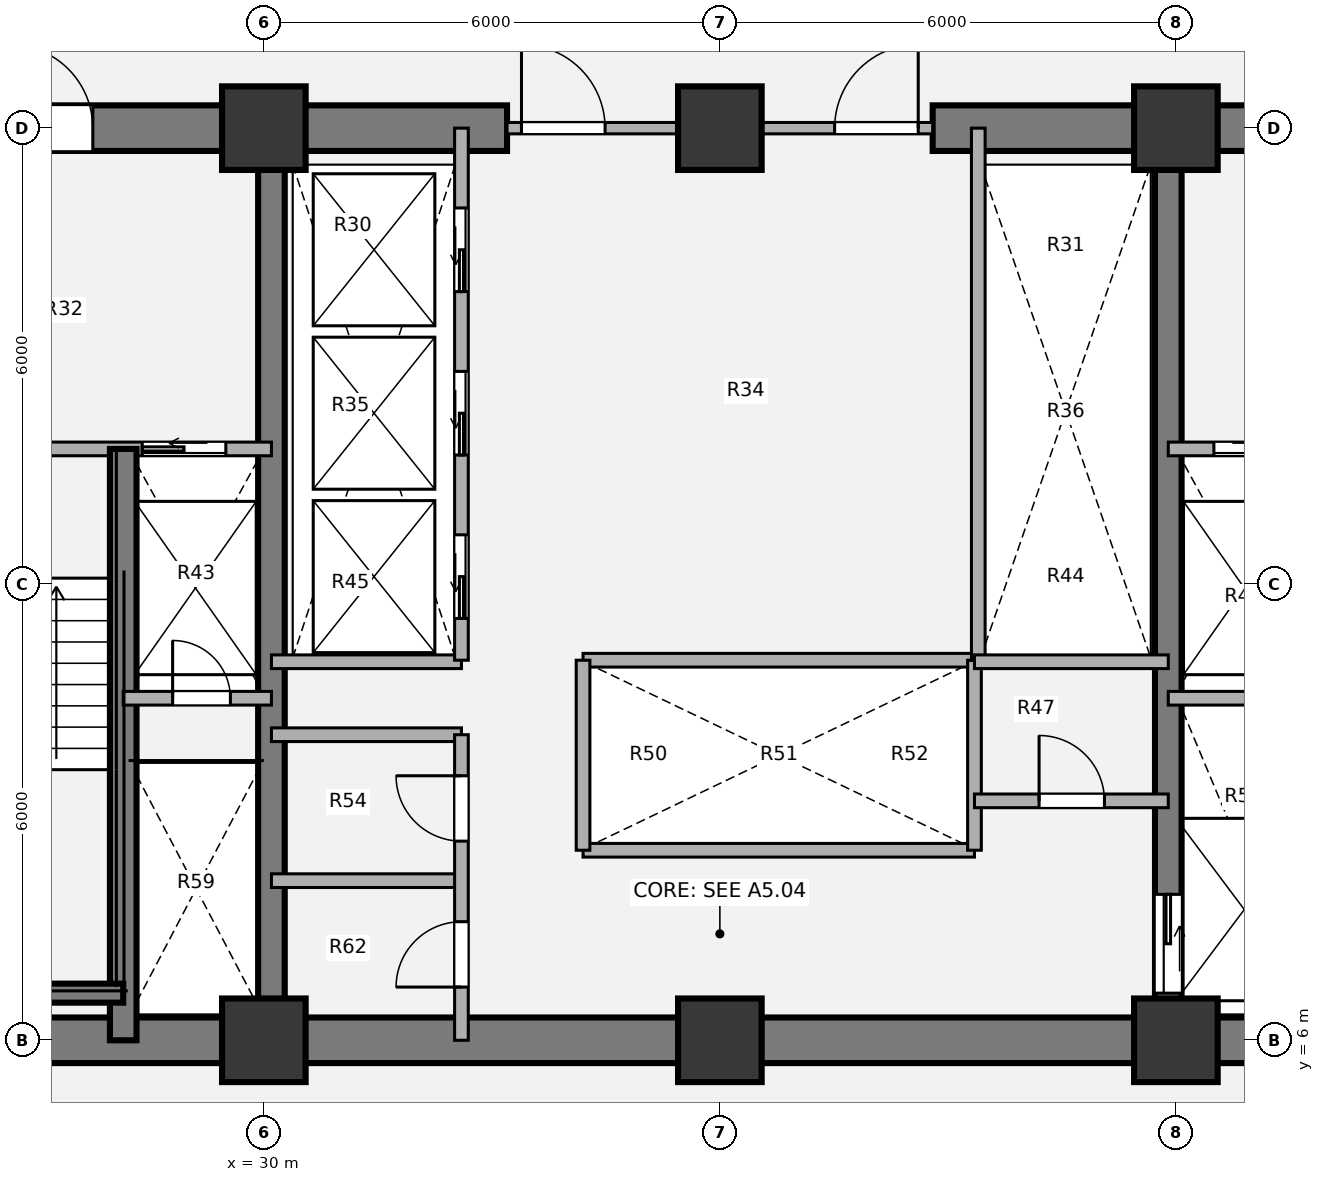
"""IFC4 building model, lengths in metres.
Left out: names, types, materials, properties, quantities, classifications, styles, units other than length and angle.
Written with IfcOpenShell. Run it as: python <this file> out.ifc"""

import sys

from ifc_helpers import new_model, si_unit, direction, frame, frame_2d, origin, origin_2d, place, context, subcontext, project, spatial, rectangle, extrude, source, transform, mapped, element, fill, save


model = new_model("IFC4")
c1 = context("Model", 3, precision=1e-05, world=origin(), true_north=direction((0.0, 1.0)))
c2 = subcontext(c1, "Body", "Model", "MODEL_VIEW")
j1 = project(units=[si_unit("LENGTHUNIT", "METRE"), si_unit("PLANEANGLEUNIT", "RADIAN")], contexts=[c1])
p1 = place(None, origin())
s1 = spatial("IfcSite", under=j1, at=p1, CompositionType="ELEMENT")
p2 = place(p1, origin())
s2 = spatial("IfcBuilding", under=s1, at=p2, CompositionType="ELEMENT")
p3 = place(p2, frame((0.0, 0.0, 68.58)))
s3 = spatial("IfcBuildingStorey", under=s2, at=p3, CompositionType="ELEMENT", Elevation=68.58)
m1 = source(origin(), c2, "Body", "SweptSolid", [
    extrude(rectangle(XDim=1.1, YDim=1.1, at=origin_2d()), origin(), (0.0, 0.0, 1.0), 3.78),
])
for number, where, z_axis, x_axis in (
    (1, (30.0, 6.0, 0.0), (0.0, 0.0, 1.0), (1.0, 0.0, 0.0)),
    (2, (36.0, 6.0, 0.0), (0.0, 0.0, 1.0), (1.0, 0.0, 0.0)),
    (3, (42.0, 6.0, 0.0), (0.0, 0.0, 1.0), (1.0, 0.0, 0.0)),
    (4, (30.0, 18.0, 0.0), (0.0, 0.0, 1.0), (1.0, 0.0, 0.0)),
    (5, (36.0, 18.0, 0.0), (0.0, 0.0, 1.0), (1.0, 0.0, 0.0)),
    (6, (42.0, 18.0, 0.0), (0.0, 0.0, 1.0), (1.0, 0.0, 0.0)),
):
    element("IfcColumn", number, at=place(p3, frame(where, z_axis=z_axis, x_axis=x_axis)), inside=s3, PredefinedType="COLUMN", context=c2, shape_type="MappedRepresentation", body=[
        mapped(m1, transform((0.0, 0.0, 0.0), x_axis=(1.0, 0.0, 0.0), y_axis=(0.0, 1.0, 0.0), z_axis=(0.0, 0.0, 1.0), scale=1.0)),
    ])
p4 = place(p3, frame((48.3, 6.0, 0.0), z_axis=(0.0, 0.0, 1.0), x_axis=(-1.0, 0.0, 0.0)))
e7 = element("IfcWall", 7, at=p4, inside=s3, PredefinedType="SHEAR", context=c2, shape_type="SweptSolid", body=[
    extrude(rectangle(XDim=24.6, YDim=0.6, at=frame_2d((12.3, 0.0))), origin(), (0.0, 0.0, 1.0), 3.78),
])
p5 = place(p3, frame((23.7, 18.0, 0.0), z_axis=(0.0, 0.0, 1.0), x_axis=(1.0, 0.0, 0.0)))
e8 = element("IfcWall", 8, at=p5, inside=s3, PredefinedType="SHEAR", context=c2, shape_type="SweptSolid", body=[
    extrude(rectangle(XDim=9.5, YDim=0.6, at=frame_2d((4.75, 0.0))), origin(), (0.0, 0.0, 1.0), 3.78),
])
p6 = place(p5, frame((2.95, 0.0, 0.0)))
e9 = element("IfcOpeningElement", 9, at=p6, cuts=e8, PredefinedType="OPENING", context=c2, shape_type="SweptSolid", body=[
    extrude(rectangle(XDim=1.1, YDim=2.1, at=origin_2d()), frame((0.55, 0.31, 1.05), z_axis=(0.0, -1.0, 0.0), x_axis=(1.0, 0.0, 0.0)), (0.0, 0.0, 1.0), 0.62),
])
p7 = place(p3, frame((38.8, 18.0, 0.0), z_axis=(0.0, 0.0, 1.0), x_axis=(1.0, 0.0, 0.0)))
e10 = element("IfcWall", 10, at=p7, inside=s3, PredefinedType="SHEAR", context=c2, shape_type="SweptSolid", body=[
    extrude(rectangle(XDim=9.5, YDim=0.6, at=frame_2d((4.75, 0.0))), origin(), (0.0, 0.0, 1.0), 3.78),
])
p8 = place(p7, frame((5.45, 0.0, 0.0)))
e11 = element("IfcOpeningElement", 11, at=p8, cuts=e10, PredefinedType="OPENING", context=c2, shape_type="SweptSolid", body=[
    extrude(rectangle(XDim=1.1, YDim=2.1, at=origin_2d()), frame((0.55, 0.31, 1.05), z_axis=(0.0, -1.0, 0.0), x_axis=(1.0, 0.0, 0.0)), (0.0, 0.0, 1.0), 0.62),
])
p9 = place(p3, frame((30.1, 6.0, 0.0), z_axis=(0.0, 0.0, 1.0), x_axis=(0.0, 1.0, 0.0)))
e12 = element("IfcWall", 12, at=p9, inside=s3, PredefinedType="SHEAR", context=c2, shape_type="SweptSolid", body=[
    extrude(rectangle(XDim=12.0, YDim=0.35, at=frame_2d((6.0, 0.0))), origin(), (0.0, 0.0, 1.0), 3.78),
])
p10 = place(p3, frame((41.9, 18.0, 0.0), z_axis=(0.0, 0.0, 1.0), x_axis=(0.0, -1.0, 0.0)))
e13 = element("IfcWall", 13, at=p10, inside=s3, PredefinedType="SHEAR", context=c2, shape_type="SweptSolid", body=[
    extrude(rectangle(XDim=12.0, YDim=0.35, at=frame_2d((6.0, 0.0))), origin(), (0.0, 0.0, 1.0), 3.78),
])
p11 = place(p10, frame((10.08, 0.0, 0.0)))
e14 = element("IfcOpeningElement", 14, at=p11, cuts=e13, PredefinedType="OPENING", context=c2, shape_type="SweptSolid", body=[
    extrude(rectangle(XDim=1.3, YDim=2.1, at=origin_2d()), frame((0.65, 0.185, 1.05), z_axis=(0.0, -1.0, 0.0), x_axis=(1.0, 0.0, 0.0)), (0.0, 0.0, 1.0), 0.37),
])
for number, where, z_axis, x_axis in (
    (15, (34.2, 11.0, 0.0), (0.0, 0.0, 1.0), (1.0, 0.0, 0.0)),
    (16, (34.2, 8.5, 0.0), (0.0, 0.0, 1.0), (1.0, 0.0, 0.0)),
):
    element("IfcWall", number, at=place(p3, frame(where, z_axis=z_axis, x_axis=x_axis)), inside=s3, PredefinedType="PARTITIONING", context=c2, shape_type="SweptSolid", body=[
        extrude(rectangle(XDim=5.15, YDim=0.18, at=frame_2d((2.575, 0.0))), origin(), (0.0, 0.0, 1.0), 3.5),
    ])
for number, where, z_axis, x_axis in (
    (17, (34.2, 8.5, 0.0), (0.0, 0.0, 1.0), (0.0, 1.0, 0.0)),
    (18, (39.35, 8.5, 0.0), (0.0, 0.0, 1.0), (0.0, 1.0, 0.0)),
):
    element("IfcWall", number, at=place(p3, frame(where, z_axis=z_axis, x_axis=x_axis)), inside=s3, PredefinedType="PARTITIONING", context=c2, shape_type="SweptSolid", body=[
        extrude(rectangle(XDim=2.5, YDim=0.18, at=frame_2d((1.25, 0.0))), origin(), (0.0, 0.0, 1.0), 3.5),
    ])
p12 = place(p3, frame((39.4, 11.0, 0.0), z_axis=(0.0, 0.0, 1.0), x_axis=(0.0, 1.0, 0.0)))
e19 = element("IfcWall", 19, at=p12, inside=s3, PredefinedType="PARTITIONING", context=c2, shape_type="SweptSolid", body=[
    extrude(rectangle(XDim=7.0, YDim=0.18, at=frame_2d((3.5, 0.0))), origin(), (0.0, 0.0, 1.0), 3.5),
])
p13 = place(p3, frame((30.1, 10.98, 0.0), z_axis=(0.0, 0.0, 1.0), x_axis=(1.0, 0.0, 0.0)))
e20 = element("IfcWall", 20, at=p13, inside=s3, PredefinedType="PARTITIONING", context=c2, shape_type="SweptSolid", body=[
    extrude(rectangle(XDim=2.5, YDim=0.18, at=frame_2d((1.25, 0.0))), origin(), (0.0, 0.0, 1.0), 3.5),
])
p14 = place(p3, frame((39.35, 10.98, 0.0), z_axis=(0.0, 0.0, 1.0), x_axis=(1.0, 0.0, 0.0)))
e21 = element("IfcWall", 21, at=p14, inside=s3, PredefinedType="PARTITIONING", context=c2, shape_type="SweptSolid", body=[
    extrude(rectangle(XDim=2.55, YDim=0.18, at=frame_2d((1.275, 0.0))), origin(), (0.0, 0.0, 1.0), 3.5),
])
for number, where, z_axis, x_axis in (
    (22, (30.1, 8.1, 0.0), (0.0, 0.0, 1.0), (1.0, 0.0, 0.0)),
    (23, (30.1, 10.02, 0.0), (0.0, 0.0, 1.0), (1.0, 0.0, 0.0)),
):
    element("IfcWall", number, at=place(p3, frame(where, z_axis=z_axis, x_axis=x_axis)), inside=s3, PredefinedType="PARTITIONING", context=c2, shape_type="SweptSolid", body=[
        extrude(rectangle(XDim=2.5, YDim=0.18, at=frame_2d((1.25, 0.0))), origin(), (0.0, 0.0, 1.0), 3.5),
    ])
p15 = place(p3, frame((32.6, 6.0, 0.0), z_axis=(0.0, 0.0, 1.0), x_axis=(0.0, 1.0, 0.0)))
e24 = element("IfcWall", 24, at=p15, inside=s3, PredefinedType="PARTITIONING", context=c2, shape_type="SweptSolid", body=[
    extrude(rectangle(XDim=4.02, YDim=0.18, at=frame_2d((2.01, 0.0))), origin(), (0.0, 0.0, 1.0), 3.5),
])
p16 = place(p15, frame((0.7, 0.0, 0.0)))
e25 = element("IfcOpeningElement", 25, at=p16, cuts=e24, PredefinedType="OPENING", context=c2, shape_type="SweptSolid", body=[
    extrude(rectangle(XDim=0.86, YDim=2.1, at=origin_2d()), frame((0.43, 0.1, 1.05), z_axis=(0.0, -1.0, 0.0), x_axis=(1.0, 0.0, 0.0)), (0.0, 0.0, 1.0), 0.2),
])
p17 = place(p15, frame((2.62, 0.0, 0.0)))
e26 = element("IfcOpeningElement", 26, at=p17, cuts=e24, PredefinedType="OPENING", context=c2, shape_type="SweptSolid", body=[
    extrude(rectangle(XDim=0.86, YDim=2.1, at=origin_2d()), frame((0.43, 0.1, 1.05), z_axis=(0.0, -1.0, 0.0), x_axis=(1.0, 0.0, 0.0)), (0.0, 0.0, 1.0), 0.2),
])
p18 = place(p3, frame((39.35, 9.15, 0.0), z_axis=(0.0, 0.0, 1.0), x_axis=(1.0, 0.0, 0.0)))
e27 = element("IfcWall", 27, at=p18, inside=s3, PredefinedType="PARTITIONING", context=c2, shape_type="SweptSolid", body=[
    extrude(rectangle(XDim=2.55, YDim=0.18, at=frame_2d((1.275, 0.0))), origin(), (0.0, 0.0, 1.0), 3.5),
])
p19 = place(p18, frame((0.85, 0.0, 0.0)))
e28 = element("IfcOpeningElement", 28, at=p19, cuts=e27, PredefinedType="OPENING", context=c2, shape_type="SweptSolid", body=[
    extrude(rectangle(XDim=0.86, YDim=2.1, at=origin_2d()), frame((0.43, 0.1, 1.05), z_axis=(0.0, -1.0, 0.0), x_axis=(1.0, 0.0, 0.0)), (0.0, 0.0, 1.0), 0.2),
])
p20 = place(p3, frame((33.2, 18.0, 0.0), z_axis=(0.0, 0.0, 1.0), x_axis=(1.0, 0.0, 0.0)))
e29 = element("IfcWall", 29, at=p20, inside=s3, PredefinedType="PARTITIONING", context=c2, shape_type="SweptSolid", body=[
    extrude(rectangle(XDim=5.6, YDim=0.15, at=frame_2d((2.8, 0.0))), origin(), (0.0, 0.0, 1.0), 2.315),
])
p21 = place(p20, frame((0.19, 0.0, 0.0)))
e30 = element("IfcOpeningElement", 30, at=p21, cuts=e29, PredefinedType="OPENING", context=c2, shape_type="SweptSolid", body=[
    extrude(rectangle(XDim=1.1, YDim=2.1, at=origin_2d()), frame((0.55, 0.085, 1.05), z_axis=(0.0, -1.0, 0.0), x_axis=(1.0, 0.0, 0.0)), (0.0, 0.0, 1.0), 0.17),
])
p22 = place(p20, frame((4.31, 0.0, 0.0)))
e31 = element("IfcOpeningElement", 31, at=p22, cuts=e29, PredefinedType="OPENING", context=c2, shape_type="SweptSolid", body=[
    extrude(rectangle(XDim=1.1, YDim=2.1, at=origin_2d()), frame((0.55, 0.085, 1.05), z_axis=(0.0, -1.0, 0.0), x_axis=(1.0, 0.0, 0.0)), (0.0, 0.0, 1.0), 0.17),
])
p23 = place(p3, frame((24.0, 13.78, 0.0), z_axis=(0.0, 0.0, 1.0), x_axis=(1.0, 0.0, 0.0)))
e32 = element("IfcWall", 32, at=p23, inside=s3, PredefinedType="PARTITIONING", context=c2, shape_type="SweptSolid", body=[
    extrude(rectangle(XDim=6.1, YDim=0.18, at=frame_2d((3.05, 0.0))), origin(), (0.0, 0.0, 1.0), 3.5),
])
p24 = place(p23, frame((1.15, 0.0, 0.0)))
e33 = element("IfcOpeningElement", 33, at=p24, cuts=e32, PredefinedType="OPENING", context=c2, shape_type="SweptSolid", body=[
    extrude(rectangle(XDim=1.1, YDim=2.1, at=origin_2d()), frame((0.55, 0.1, 1.05), z_axis=(0.0, -1.0, 0.0), x_axis=(1.0, 0.0, 0.0)), (0.0, 0.0, 1.0), 0.2),
])
p25 = place(p23, frame((4.4, 0.0, 0.0)))
e34 = element("IfcOpeningElement", 34, at=p25, cuts=e32, PredefinedType="OPENING", context=c2, shape_type="SweptSolid", body=[
    extrude(rectangle(XDim=1.1, YDim=2.1, at=origin_2d()), frame((0.55, 0.1, 1.05), z_axis=(0.0, -1.0, 0.0), x_axis=(1.0, 0.0, 0.0)), (0.0, 0.0, 1.0), 0.2),
])
p26 = place(p3, frame((28.15, 6.0, 0.0), z_axis=(0.0, 0.0, 1.0), x_axis=(0.0, 1.0, 0.0)))
e35 = element("IfcWall", 35, at=p26, inside=s3, PredefinedType="SHEAR", context=c2, shape_type="SweptSolid", body=[
    extrude(rectangle(XDim=7.78, YDim=0.35, at=frame_2d((3.89, 0.0))), origin(), (0.0, 0.0, 1.0), 3.85),
])
p27 = place(p3, frame((24.58, 6.62, 0.0), z_axis=(0.0, 0.0, 1.0), x_axis=(1.0, 0.0, 0.0)))
e36 = element("IfcWall", 36, at=p27, inside=s3, PredefinedType="SHEAR", context=c2, shape_type="SweptSolid", body=[
    extrude(rectangle(XDim=3.57, YDim=0.25, at=frame_2d((1.785, 0.0))), origin(), (0.0, 0.0, 1.0), 3.85),
])
p28 = place(p3, frame((28.15, 10.5, 0.0), z_axis=(0.0, 0.0, 1.0), x_axis=(1.0, 0.0, 0.0)))
e37 = element("IfcWall", 37, at=p28, inside=s3, PredefinedType="PARTITIONING", context=c2, shape_type="SweptSolid", body=[
    extrude(rectangle(XDim=1.95, YDim=0.18, at=frame_2d((0.975, 0.0))), origin(), (0.0, 0.0, 1.0), 3.5),
])
p29 = place(p28, frame((0.65, 0.0, 0.0)))
e38 = element("IfcOpeningElement", 38, at=p29, cuts=e37, PredefinedType="OPENING", context=c2, shape_type="SweptSolid", body=[
    extrude(rectangle(XDim=0.76, YDim=2.05, at=origin_2d()), frame((0.38, 0.1, 1.025), z_axis=(0.0, -1.0, 0.0), x_axis=(1.0, 0.0, 0.0)), (0.0, 0.0, 1.0), 0.2),
])
p30 = place(p3, frame((41.9, 13.78, 0.0), z_axis=(0.0, 0.0, 1.0), x_axis=(1.0, 0.0, 0.0)))
e39 = element("IfcWall", 39, at=p30, inside=s3, PredefinedType="PARTITIONING", context=c2, shape_type="SweptSolid", body=[
    extrude(rectangle(XDim=6.1, YDim=0.18, at=frame_2d((3.05, 0.0))), origin(), (0.0, 0.0, 1.0), 3.5),
])
p31 = place(p30, frame((0.6, 0.0, 0.0)))
e40 = element("IfcOpeningElement", 40, at=p31, cuts=e39, PredefinedType="OPENING", context=c2, shape_type="SweptSolid", body=[
    extrude(rectangle(XDim=1.1, YDim=2.1, at=origin_2d()), frame((0.55, 0.1, 1.05), z_axis=(0.0, -1.0, 0.0), x_axis=(1.0, 0.0, 0.0)), (0.0, 0.0, 1.0), 0.2),
])
p32 = place(p30, frame((3.8, 0.0, 0.0)))
e41 = element("IfcOpeningElement", 41, at=p32, cuts=e39, PredefinedType="OPENING", context=c2, shape_type="SweptSolid", body=[
    extrude(rectangle(XDim=1.1, YDim=2.1, at=origin_2d()), frame((0.55, 0.1, 1.05), z_axis=(0.0, -1.0, 0.0), x_axis=(1.0, 0.0, 0.0)), (0.0, 0.0, 1.0), 0.2),
])
p33 = place(p3, frame((41.9, 10.5, 0.0), z_axis=(0.0, 0.0, 1.0), x_axis=(1.0, 0.0, 0.0)))
e42 = element("IfcWall", 42, at=p33, inside=s3, PredefinedType="PARTITIONING", context=c2, shape_type="SweptSolid", body=[
    extrude(rectangle(XDim=1.95, YDim=0.18, at=frame_2d((0.975, 0.0))), origin(), (0.0, 0.0, 1.0), 3.5),
])
p34 = place(p3, frame((32.6, 11.0, 0.0), z_axis=(0.0, 0.0, 1.0), x_axis=(0.0, 1.0, 0.0)))
e43 = element("IfcWall", 43, at=p34, inside=s3, PredefinedType="PARTITIONING", context=c2, shape_type="SweptSolid", body=[
    extrude(rectangle(XDim=7.0, YDim=0.18, at=frame_2d((3.5, 0.0))), origin(), (0.0, 0.0, 1.0), 3.5),
])
p35 = place(p34, frame((0.55, 0.0, 0.0)))
e44 = element("IfcOpeningElement", 44, at=p35, cuts=e43, PredefinedType="OPENING", context=c2, shape_type="SweptSolid", body=[
    extrude(rectangle(XDim=1.1, YDim=2.1, at=origin_2d()), frame((0.55, 0.1, 1.05), z_axis=(0.0, -1.0, 0.0), x_axis=(1.0, 0.0, 0.0)), (0.0, 0.0, 1.0), 0.2),
])
p36 = place(p34, frame((2.7, 0.0, 0.0)))
e45 = element("IfcOpeningElement", 45, at=p36, cuts=e43, PredefinedType="OPENING", context=c2, shape_type="SweptSolid", body=[
    extrude(rectangle(XDim=1.1, YDim=2.1, at=origin_2d()), frame((0.55, 0.1, 1.05), z_axis=(0.0, -1.0, 0.0), x_axis=(1.0, 0.0, 0.0)), (0.0, 0.0, 1.0), 0.2),
])
p37 = place(p34, frame((4.85, 0.0, 0.0)))
e46 = element("IfcOpeningElement", 46, at=p37, cuts=e43, PredefinedType="OPENING", context=c2, shape_type="SweptSolid", body=[
    extrude(rectangle(XDim=1.1, YDim=2.1, at=origin_2d()), frame((0.55, 0.1, 1.05), z_axis=(0.0, -1.0, 0.0), x_axis=(1.0, 0.0, 0.0)), (0.0, 0.0, 1.0), 0.2),
])
m2 = source(origin(), c2, "Body", "SweptSolid", [
    extrude(rectangle(XDim=0.86, YDim=2.1, at=origin_2d()), frame((0.43, 0.025, 1.05), z_axis=(0.0, -1.0, 0.0), x_axis=(1.0, 0.0, 0.0)), (0.0, 0.0, 1.0), 0.05),
])
p38 = place(p16, origin())
e47 = element("IfcDoor", 47, at=p38, inside=s3, OperationType="SINGLE_SWING_LEFT", PredefinedType="DOOR", context=c2, shape_type="MappedRepresentation", body=[
    mapped(m2, transform((0.0, 0.0, 0.0), x_axis=(1.0, 0.0, 0.0), y_axis=(0.0, 1.0, 0.0), z_axis=(0.0, 0.0, 1.0), scale=1.0)),
])
fill(e25, e47)
p39 = place(p17, origin())
e48 = element("IfcDoor", 48, at=p39, inside=s3, OperationType="SINGLE_SWING_RIGHT", PredefinedType="DOOR", context=c2, shape_type="MappedRepresentation", body=[
    mapped(m2, transform((0.0, 0.0, 0.0), x_axis=(1.0, 0.0, 0.0), y_axis=(0.0, 1.0, 0.0), z_axis=(0.0, 0.0, 1.0), scale=1.0)),
])
fill(e26, e48)
p40 = place(p19, origin())
e49 = element("IfcDoor", 49, at=p40, inside=s3, OperationType="SINGLE_SWING_LEFT", PredefinedType="DOOR", context=c2, shape_type="MappedRepresentation", body=[
    mapped(m2, transform((0.0, 0.0, 0.0), x_axis=(1.0, 0.0, 0.0), y_axis=(0.0, 1.0, 0.0), z_axis=(0.0, 0.0, 1.0), scale=1.0)),
])
fill(e28, e49)
m3 = source(origin(), c2, "Body", "SweptSolid", [
    extrude(rectangle(XDim=1.1, YDim=2.1, at=origin_2d()), frame((0.55, 0.025, 1.05), z_axis=(0.0, -1.0, 0.0), x_axis=(1.0, 0.0, 0.0)), (0.0, 0.0, 1.0), 0.05),
])
p41 = place(p21, origin())
e50 = element("IfcDoor", 50, at=p41, inside=s3, OperationType="SINGLE_SWING_LEFT", PredefinedType="DOOR", context=c2, shape_type="MappedRepresentation", body=[
    mapped(m3, transform((0.0, 0.0, 0.0), x_axis=(1.0, 0.0, 0.0), y_axis=(0.0, 1.0, 0.0), z_axis=(0.0, 0.0, 1.0), scale=1.0)),
])
fill(e30, e50)
p42 = place(p22, origin())
e51 = element("IfcDoor", 51, at=p42, inside=s3, OperationType="SINGLE_SWING_RIGHT", PredefinedType="DOOR", context=c2, shape_type="MappedRepresentation", body=[
    mapped(m3, transform((0.0, 0.0, 0.0), x_axis=(1.0, 0.0, 0.0), y_axis=(0.0, 1.0, 0.0), z_axis=(0.0, 0.0, 1.0), scale=1.0)),
])
fill(e31, e51)
m4 = source(origin(), c2, "Body", "SweptSolid", [
    extrude(rectangle(XDim=1.1, YDim=2.1, at=origin_2d()), frame((0.55, 0.025, 1.05), z_axis=(0.0, -1.0, 0.0), x_axis=(1.0, 0.0, 0.0)), (0.0, 0.0, 1.0), 0.05),
])
p43 = place(p25, origin())
e52 = element("IfcDoor", 52, at=p43, inside=s3, OperationType="SLIDING_TO_LEFT", PredefinedType="DOOR", context=c2, shape_type="MappedRepresentation", body=[
    mapped(m4, transform((0.0, 0.0, 0.0), x_axis=(1.0, 0.0, 0.0), y_axis=(0.0, 1.0, 0.0), z_axis=(0.0, 0.0, 1.0), scale=1.0)),
])
fill(e34, e52)
m5 = source(origin(), c2, "Body", "SweptSolid", [
    extrude(rectangle(XDim=0.76, YDim=2.05, at=origin_2d()), frame((0.38, 0.025, 1.025), z_axis=(0.0, -1.0, 0.0), x_axis=(1.0, 0.0, 0.0)), (0.0, 0.0, 1.0), 0.05),
])
p44 = place(p29, origin())
e53 = element("IfcDoor", 53, at=p44, inside=s3, OperationType="SINGLE_SWING_LEFT", PredefinedType="DOOR", context=c2, shape_type="MappedRepresentation", body=[
    mapped(m5, transform((0.0, 0.0, 0.0), x_axis=(1.0, 0.0, 0.0), y_axis=(0.0, 1.0, 0.0), z_axis=(0.0, 0.0, 1.0), scale=1.0)),
])
fill(e38, e53)
p45 = place(p31, origin())
e54 = element("IfcDoor", 54, at=p45, inside=s3, OperationType="SLIDING_TO_RIGHT", PredefinedType="DOOR", context=c2, shape_type="MappedRepresentation", body=[
    mapped(m4, transform((0.0, 0.0, 0.0), x_axis=(1.0, 0.0, 0.0), y_axis=(0.0, 1.0, 0.0), z_axis=(0.0, 0.0, 1.0), scale=1.0)),
])
fill(e40, e54)
m6 = source(origin(), c2, "Body", "SweptSolid", [
    extrude(rectangle(XDim=1.3, YDim=2.1, at=origin_2d()), frame((0.65, 0.025, 1.05), z_axis=(0.0, -1.0, 0.0), x_axis=(1.0, 0.0, 0.0)), (0.0, 0.0, 1.0), 0.05),
])
p46 = place(p11, origin())
e55 = element("IfcDoor", 55, at=p46, inside=s3, OperationType="SLIDING_TO_LEFT", PredefinedType="DOOR", context=c2, shape_type="MappedRepresentation", body=[
    mapped(m6, transform((0.0, 0.0, 0.0), x_axis=(1.0, 0.0, 0.0), y_axis=(0.0, 1.0, 0.0), z_axis=(0.0, 0.0, 1.0), scale=1.0)),
])
fill(e14, e55)
p47 = place(p6, origin())
e56 = element("IfcDoor", 56, at=p47, inside=s3, OperationType="SINGLE_SWING_LEFT", PredefinedType="DOOR", context=c2, shape_type="MappedRepresentation", body=[
    mapped(m3, transform((0.0, 0.0, 0.0), x_axis=(1.0, 0.0, 0.0), y_axis=(0.0, 1.0, 0.0), z_axis=(0.0, 0.0, 1.0), scale=1.0)),
])
fill(e9, e56)
p48 = place(p35, origin())
e57 = element("IfcDoor", 57, at=p48, inside=s3, OperationType="SLIDING_TO_LEFT", PredefinedType="DOOR", context=c2, shape_type="MappedRepresentation", body=[
    mapped(m4, transform((0.0, 0.0, 0.0), x_axis=(1.0, 0.0, 0.0), y_axis=(0.0, 1.0, 0.0), z_axis=(0.0, 0.0, 1.0), scale=1.0)),
])
fill(e44, e57)
p49 = place(p36, origin())
e58 = element("IfcDoor", 58, at=p49, inside=s3, OperationType="SLIDING_TO_LEFT", PredefinedType="DOOR", context=c2, shape_type="MappedRepresentation", body=[
    mapped(m4, transform((0.0, 0.0, 0.0), x_axis=(1.0, 0.0, 0.0), y_axis=(0.0, 1.0, 0.0), z_axis=(0.0, 0.0, 1.0), scale=1.0)),
])
fill(e45, e58)
p50 = place(p37, origin())
e59 = element("IfcDoor", 59, at=p50, inside=s3, OperationType="SLIDING_TO_LEFT", PredefinedType="DOOR", context=c2, shape_type="MappedRepresentation", body=[
    mapped(m4, transform((0.0, 0.0, 0.0), x_axis=(1.0, 0.0, 0.0), y_axis=(0.0, 1.0, 0.0), z_axis=(0.0, 0.0, 1.0), scale=1.0)),
])
fill(e46, e59)
save(model, sys.argv[1])
